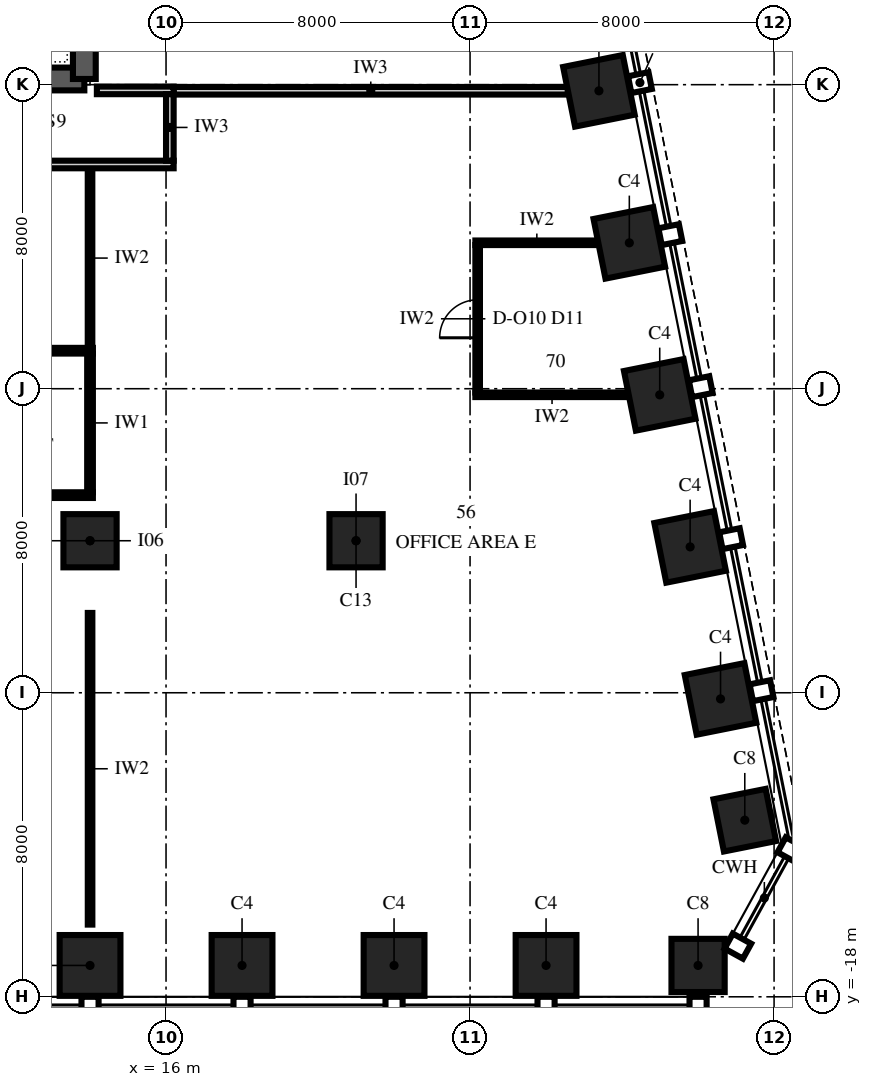
"""IFC4 building model, lengths in metres.
Left out: names, types, materials, properties, quantities, classifications, styles, units other than length and angle.
Written with IfcOpenShell. Run it as: python <this file> out.ifc"""

import sys

from ifc_helpers import new_model, si_unit, direction, frame, frame_2d, origin, origin_2d, place, context, subcontext, project, spatial, polyline, rectangle, outline, extrude, element, fill, save


model = new_model("IFC4")
c1 = context("Model", 3, precision=1e-05, world=origin(), true_north=direction((0.0, 1.0)))
c2 = subcontext(c1, "Body", "Model", "MODEL_VIEW")
j1 = project(units=[si_unit("LENGTHUNIT", "METRE"), si_unit("PLANEANGLEUNIT", "RADIAN")], contexts=[c1])
p1 = place(None, origin())
s1 = spatial("IfcSite", under=j1, at=p1, CompositionType="ELEMENT")
p2 = place(p1, origin())
s2 = spatial("IfcBuilding", under=s1, at=p2, CompositionType="ELEMENT")
p3 = place(p2, frame((0.0, 0.0, 226.0)))
s3 = spatial("IfcBuildingStorey", under=s2, at=p3, CompositionType="ELEMENT", Elevation=226.0)
for number, where, z_axis, x_axis in (
    (1, (14.0, -17.175, 0.0), (0.0, 0.0, 1.0), (1.0, 0.0, 0.0)),
    (2, (18.0, -17.175, 0.0), (0.0, 0.0, 1.0), (1.0, 0.0, 0.0)),
    (3, (22.0, -17.175, 0.0), (0.0, 0.0, 1.0), (1.0, 0.0, 0.0)),
    (4, (26.0, -17.175, 0.0), (0.0, 0.0, 1.0), (1.0, 0.0, 0.0)),
):
    element("IfcColumn", number, at=place(p3, frame(where, z_axis=z_axis, x_axis=x_axis)), inside=s3, PredefinedType="COLUMN", context=c2, shape_type="SweptSolid", body=[
        extrude(rectangle(XDim=1.6, YDim=1.6, at=origin_2d()), origin(), (0.0, 0.0, 1.0), 4.0),
    ])
for number, where, z_axis, x_axis in (
    (5, (30.0, -17.175, 0.0), (0.0, 0.0, 1.0), (1.0, 0.0, 0.0)),
    (6, (31.229, -13.353, 0.0), (0.0, 0.0, 1.0), (-0.196, 0.981, 0.0)),
):
    element("IfcColumn", number, at=place(p3, frame(where, z_axis=z_axis, x_axis=x_axis)), inside=s3, PredefinedType="COLUMN", context=c2, shape_type="SweptSolid", body=[
        extrude(rectangle(XDim=1.4, YDim=1.4, at=origin_2d()), origin(), (0.0, 0.0, 1.0), 4.0),
    ])
for number, where, z_axis, x_axis in (
    (7, (30.591, -10.162, 0.0), (0.0, 0.0, 1.0), (-0.196, 0.981, 0.0)),
    (8, (29.791, -6.162, 0.0), (0.0, 0.0, 1.0), (-0.196, 0.981, 0.0)),
    (9, (28.991, -2.162, 0.0), (0.0, 0.0, 1.0), (-0.196, 0.981, 0.0)),
    (10, (28.191, 1.838, 0.0), (0.0, 0.0, 1.0), (-0.196, 0.981, 0.0)),
    (11, (27.391, 5.838, 0.0), (0.0, 0.0, 1.0), (-0.196, 0.981, 0.0)),
):
    element("IfcColumn", number, at=place(p3, frame(where, z_axis=z_axis, x_axis=x_axis)), inside=s3, PredefinedType="COLUMN", context=c2, shape_type="SweptSolid", body=[
        extrude(rectangle(XDim=1.6, YDim=1.6, at=origin_2d()), origin(), (0.0, 0.0, 1.0), 4.0),
    ])
for number, where, z_axis, x_axis in (
    (12, (14.0, -6.0, 0.0), (0.0, 0.0, 1.0), (1.0, 0.0, 0.0)),
    (13, (21.0, -6.0, 0.0), (0.0, 0.0, 1.0), (1.0, 0.0, 0.0)),
):
    element("IfcColumn", number, at=place(p3, frame(where, z_axis=z_axis, x_axis=x_axis)), inside=s3, PredefinedType="COLUMN", context=c2, shape_type="SweptSolid", body=[
        extrude(rectangle(XDim=1.4, YDim=1.4, at=origin_2d()), origin(), (0.0, 0.0, 1.0), 4.0),
    ])
p4 = place(p3, frame((-13.85, 6.15, 0.0), z_axis=(0.0, 0.0, 1.0), x_axis=(1.0, 0.0, 0.0)))
e14 = element("IfcWall", 14, at=p4, inside=s3, PredefinedType="SHEAR", context=c2, shape_type="SweptSolid", body=[
    extrude(rectangle(XDim=27.7, YDim=0.6, at=frame_2d((13.85, 0.0))), origin(), (0.0, 0.0, 1.0), 4.0),
])
p5 = place(p3, frame((13.85, 6.15, 0.0), z_axis=(0.0, 0.0, 1.0), x_axis=(0.0, 1.0, 0.0)))
e15 = element("IfcWall", 15, at=p5, inside=s3, PredefinedType="SHEAR", context=c2, shape_type="SweptSolid", body=[
    extrude(outline(polyline([(0.0, -0.3), (17.7, -0.3), (17.7, 0.0), (17.4, 0.0), (17.4, 0.3), (0.3, 0.3), (0.3, 0.0), (0.0, 0.0), (0.0, -0.3)])), origin(), (0.0, 0.0, 1.0), 4.0),
])
p6 = place(p5, frame((4.15, 0.0, 0.0)))
e16 = element("IfcOpeningElement", 16, at=p6, cuts=e15, PredefinedType="OPENING", context=c2, shape_type="SweptSolid", body=[
    extrude(rectangle(XDim=1.8, YDim=2.4, at=frame_2d((0.9, 1.2))), frame((0.0, 0.315, 0.0), z_axis=(0.0, -1.0, 0.0), x_axis=(1.0, 0.0, 0.0)), (0.0, 0.0, 1.0), 0.63),
])
p7 = place(p3, frame((9.925, -4.8, 0.0), z_axis=(0.0, 0.0, 1.0), x_axis=(1.0, 0.0, 0.0)))
e17 = element("IfcWall", 17, at=p7, inside=s3, PredefinedType="PARTITIONING", context=c2, shape_type="SweptSolid", body=[
    extrude(rectangle(XDim=4.15, YDim=0.15, at=frame_2d((2.075, 0.0))), origin(), (0.0, 0.0, 1.0), 3.25),
])
p8 = place(p3, frame((24.14, -2.16, 0.0), z_axis=(0.0, 0.0, 1.0), x_axis=(1.0, 0.0, 0.0)))
e18 = element("IfcWall", 18, at=p8, inside=s3, PredefinedType="PARTITIONING", context=c2, shape_type="SweptSolid", body=[
    extrude(rectangle(XDim=4.035, YDim=0.12, at=frame_2d((2.018, 0.0))), origin(), (0.0, 0.0, 1.0), 3.25),
])
p9 = place(p3, frame((9.925, -1.0, 0.0), z_axis=(0.0, 0.0, 1.0), x_axis=(1.0, 0.0, 0.0)))
e19 = element("IfcWall", 19, at=p9, inside=s3, PredefinedType="PARTITIONING", context=c2, shape_type="SweptSolid", body=[
    extrude(rectangle(XDim=4.15, YDim=0.15, at=frame_2d((2.075, 0.0))), origin(), (0.0, 0.0, 1.0), 3.25),
])
p10 = place(p9, frame((1.575, 0.0, 0.0)))
e20 = element("IfcOpeningElement", 20, at=p10, cuts=e19, PredefinedType="OPENING", context=c2, shape_type="SweptSolid", body=[
    extrude(rectangle(XDim=1.0, YDim=2.3, at=frame_2d((0.5, 1.15))), frame((0.0, 0.09, 0.0), z_axis=(0.0, -1.0, 0.0), x_axis=(1.0, 0.0, 0.0)), (0.0, 0.0, 1.0), 0.18),
])
p11 = place(p3, frame((24.14, 1.84, 0.0), z_axis=(0.0, 0.0, 1.0), x_axis=(1.0, 0.0, 0.0)))
e21 = element("IfcWall", 21, at=p11, inside=s3, PredefinedType="PARTITIONING", context=c2, shape_type="SweptSolid", body=[
    extrude(rectangle(XDim=3.235, YDim=0.12, at=frame_2d((1.617, 0.0))), origin(), (0.0, 0.0, 1.0), 3.25),
])
p12 = place(p3, frame((-16.0, 3.9, 0.0), z_axis=(0.0, 0.0, 1.0), x_axis=(1.0, 0.0, 0.0)))
e22 = element("IfcWall", 22, at=p12, inside=s3, PredefinedType="PARTITIONING", context=c2, shape_type="SweptSolid", body=[
    extrude(rectangle(XDim=32.2, YDim=0.2, at=frame_2d((16.1, 0.0))), origin(), (0.0, 0.0, 1.0), 3.25),
])
p13 = place(p12, frame((5.4, 0.0, 0.0)))
e23 = element("IfcOpeningElement", 23, at=p13, cuts=e22, PredefinedType="OPENING", context=c2, shape_type="SweptSolid", body=[
    extrude(rectangle(XDim=1.2, YDim=2.4, at=frame_2d((0.6, 1.2))), frame((0.0, 0.115, 0.0), z_axis=(0.0, -1.0, 0.0), x_axis=(1.0, 0.0, 0.0)), (0.0, 0.0, 1.0), 0.23),
])
p14 = place(p12, frame((23.4, 0.0, 0.0)))
e24 = element("IfcOpeningElement", 24, at=p14, cuts=e22, PredefinedType="OPENING", context=c2, shape_type="SweptSolid", body=[
    extrude(rectangle(XDim=1.2, YDim=2.4, at=frame_2d((0.6, 1.2))), frame((0.0, 0.115, 0.0), z_axis=(0.0, -1.0, 0.0), x_axis=(1.0, 0.0, 0.0)), (0.0, 0.0, 1.0), 0.23),
])
p15 = place(p3, frame((16.2, 5.84, 0.0), z_axis=(0.0, 0.0, 1.0), x_axis=(1.0, 0.0, 0.0)))
e25 = element("IfcWall", 25, at=p15, inside=s3, PredefinedType="PARTITIONING", context=c2, shape_type="SweptSolid", body=[
    extrude(rectangle(XDim=10.375, YDim=0.2, at=frame_2d((5.188, 0.0))), origin(), (0.0, 0.0, 1.0), 2.842),
])
p16 = place(p3, frame((14.18, 5.85, 0.0), z_axis=(0.0, 0.0, 1.0), x_axis=(1.0, 0.0, 0.0)))
e26 = element("IfcWall", 26, at=p16, inside=s3, PredefinedType="PARTITIONING", context=c2, shape_type="SweptSolid", body=[
    extrude(rectangle(XDim=2.02, YDim=0.2, at=frame_2d((1.01, 0.0))), origin(), (0.0, 0.0, 1.0), 3.85),
])
p17 = place(p3, frame((14.0, -4.725, 0.0), z_axis=(0.0, 0.0, 1.0), x_axis=(0.0, 1.0, 0.0)))
e27 = element("IfcWall", 27, at=p17, inside=s3, PredefinedType="PARTITIONING", context=c2, shape_type="SweptSolid", body=[
    extrude(rectangle(XDim=3.65, YDim=0.15, at=frame_2d((1.825, 0.0))), origin(), (0.0, 0.0, 1.0), 3.25),
])
p18 = place(p3, frame((16.1, 4.0, 0.0), z_axis=(0.0, 0.0, 1.0), x_axis=(0.0, 1.0, 0.0)))
e28 = element("IfcWall", 28, at=p18, inside=s3, PredefinedType="PARTITIONING", context=c2, shape_type="SweptSolid", body=[
    extrude(rectangle(XDim=1.75, YDim=0.2, at=frame_2d((0.875, 0.0))), origin(), (0.0, 0.0, 1.0), 3.85),
])
p19 = place(p3, frame((24.2, -2.1, 0.0), z_axis=(0.0, 0.0, 1.0), x_axis=(0.0, 1.0, 0.0)))
e29 = element("IfcWall", 29, at=p19, inside=s3, PredefinedType="PARTITIONING", context=c2, shape_type="SweptSolid", body=[
    extrude(rectangle(XDim=3.88, YDim=0.12, at=frame_2d((1.94, 0.0))), origin(), (0.0, 0.0, 1.0), 3.85),
])
p20 = place(p19, frame((1.44, 0.0, 0.0)))
e30 = element("IfcOpeningElement", 30, at=p20, cuts=e29, PredefinedType="OPENING", context=c2, shape_type="SweptSolid", body=[
    extrude(rectangle(XDim=1.0, YDim=2.4, at=frame_2d((0.5, 1.2))), frame((0.0, 0.075, 0.0), z_axis=(0.0, -1.0, 0.0), x_axis=(1.0, 0.0, 0.0)), (0.0, 0.0, 1.0), 0.15),
])
p21 = place(p3, frame((14.001, -16.1, 0.0), z_axis=(0.0, 0.0, 1.0), x_axis=(0.0, 1.0, 0.0)))
e31 = element("IfcWall", 31, at=p21, inside=s3, PredefinedType="PARTITIONING", context=c2, shape_type="SweptSolid", body=[
    extrude(rectangle(XDim=8.2, YDim=0.12, at=frame_2d((4.1, 0.0))), origin(), (0.0, 0.0, 1.0), 3.25),
])
p22 = place(p3, frame((14.0, -0.905, 0.0), z_axis=(0.0, 0.0, 1.0), x_axis=(0.0, 1.0, 0.0)))
e32 = element("IfcWall", 32, at=p22, inside=s3, PredefinedType="PARTITIONING", context=c2, shape_type="SweptSolid", body=[
    extrude(rectangle(XDim=4.685, YDim=0.12, at=frame_2d((2.343, 0.0))), origin(), (0.0, 0.0, 1.0), 3.25),
])
p23 = place(p20, origin())
e33 = element("IfcDoor", 33, at=p23, inside=s3, OperationType="SINGLE_SWING_RIGHT", PredefinedType="DOOR", context=c2, shape_type="SweptSolid", body=[
    extrude(rectangle(XDim=1.0, YDim=2.4, at=frame_2d((0.5, 1.2))), frame((0.0, 0.06, 0.0), z_axis=(0.0, -1.0, 0.0), x_axis=(1.0, 0.0, 0.0)), (0.0, 0.0, 1.0), 0.12),
])
fill(e30, e33)
save(model, sys.argv[1])
